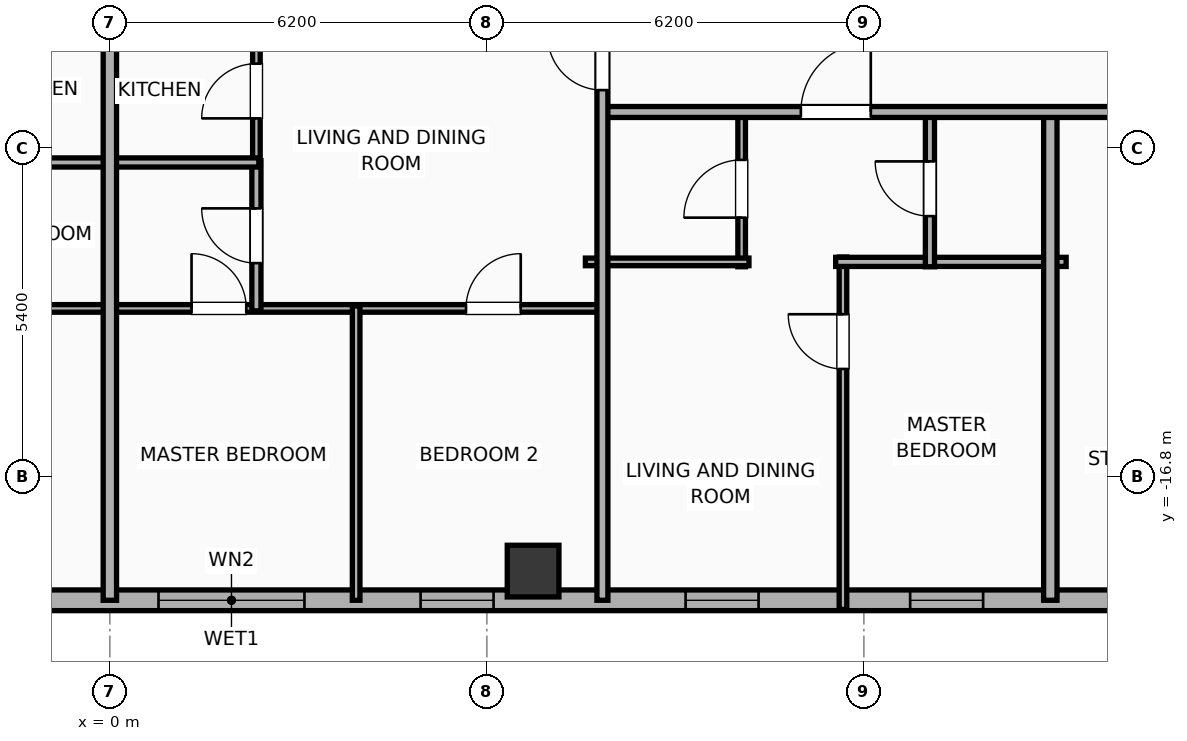
"""IFC4 building model, lengths in metres.
Left out: names, types, materials, properties, quantities, classifications, styles, units other than length and angle.
Written with IfcOpenShell. Run it as: python <this file> out.ifc"""

import sys

from ifc_helpers import new_model, si_unit, direction, frame, frame_2d, origin, origin_2d, place, context, subcontext, project, spatial, rectangle, hollow_rectangle, extrude, element, fill, save


model = new_model("IFC4")
c1 = context("Model", 3, precision=1e-05, world=origin(), true_north=direction((0.0, 1.0)))
c2 = subcontext(c1, "Body", "Model", "MODEL_VIEW")
j1 = project(units=[si_unit("LENGTHUNIT", "METRE"), si_unit("PLANEANGLEUNIT", "RADIAN")], contexts=[c1])
p1 = place(None, origin())
s1 = spatial("IfcSite", under=j1, at=p1, CompositionType="ELEMENT")
p2 = place(p1, origin())
s2 = spatial("IfcBuilding", under=s1, at=p2, CompositionType="ELEMENT")
p3 = place(p2, frame((0.0, 0.0, 215.8)))
s3 = spatial("IfcBuildingStorey", under=s2, at=p3, CompositionType="ELEMENT", Elevation=215.8)
p4 = place(p3, frame((6.96, -18.35, 0.0), z_axis=(0.0, 0.0, 1.0), x_axis=(1.0, 0.0, 0.0)))
e1 = element("IfcColumn", 1, at=p4, inside=s3, PredefinedType="COLUMN", context=c2, shape_type="SweptSolid", body=[
    extrude(hollow_rectangle(XDim=0.85, YDim=0.85, WallThickness=0.028, at=origin_2d()), origin(), (0.0, 0.0, 1.0), 3.9),
])
p5 = place(p3, frame((26.783, -18.83, 0.0), z_axis=(0.0, 0.0, 1.0), x_axis=(-1.0, 0.0, 0.0)))
e2 = element("IfcWall", 2, at=p5, inside=s3, PredefinedType="ELEMENTEDWALL", context=c2, shape_type="SweptSolid", body=[
    extrude(rectangle(XDim=49.566, YDim=0.34, at=frame_2d((24.783, 0.0))), origin(), (0.0, 0.0, 1.0), 3.65),
])
p6 = place(p5, frame((23.583, 0.0, 0.75)))
e3 = element("IfcOpeningElement", 3, at=p6, cuts=e2, PredefinedType="OPENING", context=c2, shape_type="SweptSolid", body=[
    extrude(rectangle(XDim=2.4, YDim=2.1, at=frame_2d((1.2, 1.05))), frame((0.0, 0.18, 0.0), z_axis=(0.0, -1.0, 0.0), x_axis=(1.0, 0.0, 0.0)), (0.0, 0.0, 1.0), 0.36),
])
p7 = place(p5, frame((41.756, 0.0, 0.75)))
e4 = element("IfcOpeningElement", 4, at=p7, cuts=e2, PredefinedType="OPENING", context=c2, shape_type="SweptSolid", body=[
    extrude(rectangle(XDim=2.4, YDim=2.1, at=frame_2d((1.2, 1.05))), frame((0.0, 0.18, 0.0), z_axis=(0.0, -1.0, 0.0), x_axis=(1.0, 0.0, 0.0)), (0.0, 0.0, 1.0), 0.36),
])
p8 = place(p5, frame((47.222, 0.0, 0.75)))
e5 = element("IfcOpeningElement", 5, at=p8, cuts=e2, PredefinedType="OPENING", context=c2, shape_type="SweptSolid", body=[
    extrude(rectangle(XDim=1.2, YDim=2.05, at=frame_2d((0.6, 1.025))), frame((0.0, 0.18, 0.0), z_axis=(0.0, -1.0, 0.0), x_axis=(1.0, 0.0, 0.0)), (0.0, 0.0, 1.0), 0.36),
])
p9 = place(p5, frame((45.08, 0.0, 0.75)))
e6 = element("IfcOpeningElement", 6, at=p9, cuts=e2, PredefinedType="OPENING", context=c2, shape_type="SweptSolid", body=[
    extrude(rectangle(XDim=1.2, YDim=2.05, at=frame_2d((0.6, 1.025))), frame((0.0, 0.18, 0.0), z_axis=(0.0, -1.0, 0.0), x_axis=(1.0, 0.0, 0.0)), (0.0, 0.0, 1.0), 0.36),
])
p10 = place(p5, frame((37.289, 0.0, 0.75)))
e7 = element("IfcOpeningElement", 7, at=p10, cuts=e2, PredefinedType="OPENING", context=c2, shape_type="SweptSolid", body=[
    extrude(rectangle(XDim=1.2, YDim=2.05, at=frame_2d((0.6, 1.025))), frame((0.0, 0.18, 0.0), z_axis=(0.0, -1.0, 0.0), x_axis=(1.0, 0.0, 0.0)), (0.0, 0.0, 1.0), 0.36),
])
p11 = place(p5, frame((16.115, 0.0, 0.75)))
e8 = element("IfcOpeningElement", 8, at=p11, cuts=e2, PredefinedType="OPENING", context=c2, shape_type="SweptSolid", body=[
    extrude(rectangle(XDim=1.2, YDim=2.05, at=frame_2d((0.6, 1.025))), frame((0.0, 0.18, 0.0), z_axis=(0.0, -1.0, 0.0), x_axis=(1.0, 0.0, 0.0)), (0.0, 0.0, 1.0), 0.36),
])
p12 = place(p5, frame((12.422, 0.0, 0.75)))
e9 = element("IfcOpeningElement", 9, at=p12, cuts=e2, PredefinedType="OPENING", context=c2, shape_type="SweptSolid", body=[
    extrude(rectangle(XDim=1.2, YDim=2.05, at=frame_2d((0.6, 1.025))), frame((0.0, 0.18, 0.0), z_axis=(0.0, -1.0, 0.0), x_axis=(1.0, 0.0, 0.0)), (0.0, 0.0, 1.0), 0.36),
])
p13 = place(p5, frame((8.09, 0.0, 0.75)))
e10 = element("IfcOpeningElement", 10, at=p13, cuts=e2, PredefinedType="OPENING", context=c2, shape_type="SweptSolid", body=[
    extrude(rectangle(XDim=1.2, YDim=2.05, at=frame_2d((0.6, 1.025))), frame((0.0, 0.18, 0.0), z_axis=(0.0, -1.0, 0.0), x_axis=(1.0, 0.0, 0.0)), (0.0, 0.0, 1.0), 0.36),
])
p14 = place(p5, frame((4.637, 0.0, 0.75)))
e11 = element("IfcOpeningElement", 11, at=p14, cuts=e2, PredefinedType="OPENING", context=c2, shape_type="SweptSolid", body=[
    extrude(rectangle(XDim=1.2, YDim=2.05, at=frame_2d((0.6, 1.025))), frame((0.0, 0.18, 0.0), z_axis=(0.0, -1.0, 0.0), x_axis=(1.0, 0.0, 0.0)), (0.0, 0.0, 1.0), 0.36),
])
p15 = place(p5, frame((1.811, 0.0, 0.75)))
e12 = element("IfcOpeningElement", 12, at=p15, cuts=e2, PredefinedType="OPENING", context=c2, shape_type="SweptSolid", body=[
    extrude(rectangle(XDim=1.2, YDim=2.05, at=frame_2d((0.6, 1.025))), frame((0.0, 0.18, 0.0), z_axis=(0.0, -1.0, 0.0), x_axis=(1.0, 0.0, 0.0)), (0.0, 0.0, 1.0), 0.36),
])
p16 = place(p5, frame((32.253, 0.0, 0.75)))
e13 = element("IfcOpeningElement", 13, at=p16, cuts=e2, PredefinedType="OPENING", context=c2, shape_type="SweptSolid", body=[
    extrude(rectangle(XDim=1.2, YDim=2.05, at=frame_2d((0.6, 1.025))), frame((0.0, 0.18, 0.0), z_axis=(0.0, -1.0, 0.0), x_axis=(1.0, 0.0, 0.0)), (0.0, 0.0, 1.0), 0.36),
])
p17 = place(p5, frame((27.853, 0.0, 0.75)))
e14 = element("IfcOpeningElement", 14, at=p17, cuts=e2, PredefinedType="OPENING", context=c2, shape_type="SweptSolid", body=[
    extrude(rectangle(XDim=1.2, YDim=2.05, at=frame_2d((0.6, 1.025))), frame((0.0, 0.18, 0.0), z_axis=(0.0, -1.0, 0.0), x_axis=(1.0, 0.0, 0.0)), (0.0, 0.0, 1.0), 0.36),
])
p18 = place(p5, frame((20.473, 0.0, 0.75)))
e15 = element("IfcOpeningElement", 15, at=p18, cuts=e2, PredefinedType="OPENING", context=c2, shape_type="SweptSolid", body=[
    extrude(rectangle(XDim=1.2, YDim=2.05, at=frame_2d((0.6, 1.025))), frame((0.0, 0.18, 0.0), z_axis=(0.0, -1.0, 0.0), x_axis=(1.0, 0.0, 0.0)), (0.0, 0.0, 1.0), 0.36),
])
p19 = place(p3, frame((12.056, -18.98, 0.0), z_axis=(0.0, 0.0, 1.0), x_axis=(0.0, 1.0, 0.0)))
e16 = element("IfcWall", 16, at=p19, inside=s3, PredefinedType="PARTITIONING", context=c2, shape_type="SweptSolid", body=[
    extrude(rectangle(XDim=5.795, YDim=0.125, at=frame_2d((2.897, 0.0))), origin(), (0.0, 0.0, 1.0), 3.65),
])
p20 = place(p19, frame((3.954, 0.0, 0.0)))
e17 = element("IfcOpeningElement", 17, at=p20, cuts=e16, PredefinedType="OPENING", context=c2, shape_type="SweptSolid", body=[
    extrude(rectangle(XDim=0.9, YDim=2.05, at=frame_2d((0.45, 1.025))), frame((0.0, 0.073, 0.0), z_axis=(0.0, -1.0, 0.0), x_axis=(1.0, 0.0, 0.0)), (0.0, 0.0, 1.0), 0.145),
])
p21 = place(p3, frame((11.936, -13.265, 0.0), z_axis=(0.0, 0.0, 1.0), x_axis=(1.0, 0.0, 0.0)))
e18 = element("IfcWall", 18, at=p21, inside=s3, PredefinedType="PLUMBINGWALL", context=c2, shape_type="SweptSolid", body=[
    extrude(rectangle(XDim=3.79, YDim=0.15, at=frame_2d((1.895, 0.0))), origin(), (0.0, 0.0, 1.0), 3.65),
])
p22 = place(p3, frame((10.39, -13.345, 0.0), z_axis=(0.0, 0.0, 1.0), x_axis=(0.0, 1.0, 0.0)))
e19 = element("IfcWall", 19, at=p22, inside=s3, PredefinedType="PARTITIONING", context=c2, shape_type="SweptSolid", body=[
    extrude(rectangle(XDim=2.565, YDim=0.125, at=frame_2d((1.282, 0.0))), origin(), (0.0, 0.0, 1.0), 3.65),
])
p23 = place(p22, frame((0.808, 0.0, 0.0)))
e20 = element("IfcOpeningElement", 20, at=p23, cuts=e19, PredefinedType="OPENING", context=c2, shape_type="SweptSolid", body=[
    extrude(rectangle(XDim=0.95, YDim=2.05, at=frame_2d((0.475, 1.025))), frame((0.0, 0.073, 0.0), z_axis=(0.0, -1.0, 0.0), x_axis=(1.0, 0.0, 0.0)), (0.0, 0.0, 1.0), 0.145),
])
p24 = place(p3, frame((7.82, -13.265, 0.0), z_axis=(0.0, 0.0, 1.0), x_axis=(1.0, 0.0, 0.0)))
e21 = element("IfcWall", 21, at=p24, inside=s3, PredefinedType="PARTITIONING", context=c2, shape_type="SweptSolid", body=[
    extrude(rectangle(XDim=2.69, YDim=0.125, at=frame_2d((1.345, 0.0))), origin(), (0.0, 0.0, 1.0), 3.65),
])
p25 = place(p3, frame((13.486, -13.345, 0.0), z_axis=(0.0, 0.0, 1.0), x_axis=(0.0, 1.0, 0.0)))
e22 = element("IfcWall", 22, at=p25, inside=s3, PredefinedType="PLUMBINGWALL", context=c2, shape_type="SweptSolid", body=[
    extrude(rectangle(XDim=2.565, YDim=0.15, at=frame_2d((1.282, 0.0))), origin(), (0.0, 0.0, 1.0), 3.65),
])
p26 = place(p25, frame((0.833, 0.0, 0.0)))
e23 = element("IfcOpeningElement", 23, at=p26, cuts=e22, PredefinedType="OPENING", context=c2, shape_type="SweptSolid", body=[
    extrude(rectangle(XDim=0.9, YDim=2.05, at=frame_2d((0.45, 1.025))), frame((0.0, 0.085, 0.0), z_axis=(0.0, -1.0, 0.0), x_axis=(1.0, 0.0, 0.0)), (0.0, 0.0, 1.0), 0.17),
])
p27 = place(p3, frame((15.466, -18.83, 0.0), z_axis=(0.0, 0.0, 1.0), x_axis=(0.0, 1.0, 0.0)))
e24 = element("IfcWall", 24, at=p27, inside=s3, PredefinedType="PARTITIONING", context=c2, shape_type="SweptSolid", body=[
    extrude(rectangle(XDim=8.11, YDim=0.22, at=frame_2d((4.055, 0.0))), origin(), (0.0, 0.0, 1.0), 3.65),
])
p28 = place(p3, frame((8.08, -10.8, 0.0), z_axis=(0.0, 0.0, 1.0), x_axis=(1.0, 0.0, 0.0)))
e25 = element("IfcWall", 25, at=p28, inside=s3, PredefinedType="PARTITIONING", context=c2, shape_type="SweptSolid", body=[
    extrude(rectangle(XDim=22.15, YDim=0.18, at=frame_2d((11.075, 0.0))), origin(), (0.0, 0.0, 1.0), 3.65),
])
p29 = place(p28, frame((3.283, 0.0, 0.0)))
e26 = element("IfcOpeningElement", 26, at=p29, cuts=e25, PredefinedType="OPENING", context=c2, shape_type="SweptSolid", body=[
    extrude(rectangle(XDim=1.15, YDim=2.05, at=frame_2d((0.575, 1.025))), frame((0.0, 0.1, 0.0), z_axis=(0.0, -1.0, 0.0), x_axis=(1.0, 0.0, 0.0)), (0.0, 0.0, 1.0), 0.2),
])
p30 = place(p28, frame((9.229, 0.0, 0.0)))
e27 = element("IfcOpeningElement", 27, at=p30, cuts=e25, PredefinedType="OPENING", context=c2, shape_type="SweptSolid", body=[
    extrude(rectangle(XDim=1.15, YDim=2.05, at=frame_2d((0.575, 1.025))), frame((0.0, 0.1, 0.0), z_axis=(0.0, -1.0, 0.0), x_axis=(1.0, 0.0, 0.0)), (0.0, 0.0, 1.0), 0.2),
])
p31 = place(p28, frame((18.084, 0.0, 0.0)))
e28 = element("IfcOpeningElement", 28, at=p31, cuts=e25, PredefinedType="OPENING", context=c2, shape_type="SweptSolid", body=[
    extrude(rectangle(XDim=1.15, YDim=2.05, at=frame_2d((0.575, 1.025))), frame((0.0, 0.1, 0.0), z_axis=(0.0, -1.0, 0.0), x_axis=(1.0, 0.0, 0.0)), (0.0, 0.0, 1.0), 0.2),
])
p32 = place(p3, frame((-8.08, -14.03, 0.0), z_axis=(0.0, 0.0, 1.0), x_axis=(1.0, 0.0, 0.0)))
e29 = element("IfcWall", 29, at=p32, inside=s3, PredefinedType="PARTITIONING", context=c2, shape_type="SweptSolid", body=[
    extrude(rectangle(XDim=8.06, YDim=0.125, at=frame_2d((4.03, 0.0))), origin(), (0.0, 0.0, 1.0), 3.65),
])
p33 = place(p32, frame((1.323, 0.0, 0.0)))
e30 = element("IfcOpeningElement", 30, at=p33, cuts=e29, PredefinedType="OPENING", context=c2, shape_type="SweptSolid", body=[
    extrude(rectangle(XDim=0.9, YDim=2.05, at=frame_2d((0.45, 1.025))), frame((0.0, 0.073, 0.0), z_axis=(0.0, -1.0, 0.0), x_axis=(1.0, 0.0, 0.0)), (0.0, 0.0, 1.0), 0.145),
])
p34 = place(p32, frame((4.547, 0.0, 0.0)))
e31 = element("IfcOpeningElement", 31, at=p34, cuts=e29, PredefinedType="OPENING", context=c2, shape_type="SweptSolid", body=[
    extrude(rectangle(XDim=0.9, YDim=2.05, at=frame_2d((0.45, 1.025))), frame((0.0, 0.073, 0.0), z_axis=(0.0, -1.0, 0.0), x_axis=(1.0, 0.0, 0.0)), (0.0, 0.0, 1.0), 0.145),
])
p35 = place(p3, frame((-2.45, -11.63, 0.0), z_axis=(0.0, 0.0, 1.0), x_axis=(1.0, 0.0, 0.0)))
e32 = element("IfcWall", 32, at=p35, inside=s3, PredefinedType="PLUMBINGWALL", context=c2, shape_type="SweptSolid", body=[
    extrude(rectangle(XDim=2.43, YDim=0.15, at=frame_2d((1.215, 0.0))), origin(), (0.0, 0.0, 1.0), 3.65),
])
p36 = place(p3, frame((0.02, -14.03, 0.0), z_axis=(0.0, 0.0, 1.0), x_axis=(1.0, 0.0, 0.0)))
e33 = element("IfcWall", 33, at=p36, inside=s3, PredefinedType="PARTITIONING", context=c2, shape_type="SweptSolid", body=[
    extrude(rectangle(XDim=8.06, YDim=0.125, at=frame_2d((4.03, 0.0))), origin(), (0.0, 0.0, 1.0), 3.65),
])
p37 = place(p36, frame((1.323, 0.0, 0.0)))
e34 = element("IfcOpeningElement", 34, at=p37, cuts=e33, PredefinedType="OPENING", context=c2, shape_type="SweptSolid", body=[
    extrude(rectangle(XDim=0.9, YDim=2.05, at=frame_2d((0.45, 1.025))), frame((0.0, 0.073, 0.0), z_axis=(0.0, -1.0, 0.0), x_axis=(1.0, 0.0, 0.0)), (0.0, 0.0, 1.0), 0.145),
])
p38 = place(p36, frame((5.837, 0.0, 0.0)))
e35 = element("IfcOpeningElement", 35, at=p38, cuts=e33, PredefinedType="OPENING", context=c2, shape_type="SweptSolid", body=[
    extrude(rectangle(XDim=0.9, YDim=2.05, at=frame_2d((0.45, 1.025))), frame((0.0, 0.073, 0.0), z_axis=(0.0, -1.0, 0.0), x_axis=(1.0, 0.0, 0.0)), (0.0, 0.0, 1.0), 0.145),
])
p39 = place(p3, frame((2.41, -11.66, 0.0), z_axis=(0.0, 0.0, 1.0), x_axis=(0.0, 1.0, 0.0)))
e36 = element("IfcWall", 36, at=p39, inside=s3, PredefinedType="PARTITIONING", context=c2, shape_type="SweptSolid", body=[
    extrude(rectangle(XDim=2.41, YDim=0.125, at=frame_2d((1.205, 0.0))), origin(), (0.0, 0.0, 1.0), 3.65),
])
p40 = place(p39, frame((0.755, 0.0, 0.0)))
e37 = element("IfcOpeningElement", 37, at=p40, cuts=e36, PredefinedType="OPENING", context=c2, shape_type="SweptSolid", body=[
    extrude(rectangle(XDim=0.9, YDim=2.05, at=frame_2d((0.45, 1.025))), frame((0.0, 0.073, 0.0), z_axis=(0.0, -1.0, 0.0), x_axis=(1.0, 0.0, 0.0)), (0.0, 0.0, 1.0), 0.145),
])
p41 = place(p3, frame((2.41, -14.07, 0.0), z_axis=(0.0, 0.0, 1.0), x_axis=(0.0, 1.0, 0.0)))
e38 = element("IfcWall", 38, at=p41, inside=s3, PredefinedType="PLUMBINGWALL", context=c2, shape_type="SweptSolid", body=[
    extrude(rectangle(XDim=2.47, YDim=0.15, at=frame_2d((1.235, 0.0))), origin(), (0.0, 0.0, 1.0), 3.65),
])
p42 = place(p41, frame((0.785, 0.0, 0.0)))
e39 = element("IfcOpeningElement", 39, at=p42, cuts=e38, PredefinedType="OPENING", context=c2, shape_type="SweptSolid", body=[
    extrude(rectangle(XDim=0.9, YDim=2.05, at=frame_2d((0.45, 1.025))), frame((0.0, 0.085, 0.0), z_axis=(0.0, -1.0, 0.0), x_axis=(1.0, 0.0, 0.0)), (0.0, 0.0, 1.0), 0.17),
])
p43 = place(p3, frame((0.02, -11.63, 0.0), z_axis=(0.0, 0.0, 1.0), x_axis=(1.0, 0.0, 0.0)))
e40 = element("IfcWall", 40, at=p43, inside=s3, PredefinedType="PLUMBINGWALL", context=c2, shape_type="SweptSolid", body=[
    extrude(rectangle(XDim=2.43, YDim=0.15, at=frame_2d((1.215, 0.0))), origin(), (0.0, 0.0, 1.0), 3.65),
])
p44 = place(p3, frame((4.05, -18.83, 0.0), z_axis=(0.0, 0.0, 1.0), x_axis=(0.0, 1.0, 0.0)))
e41 = element("IfcWall", 41, at=p44, inside=s3, PredefinedType="PARTITIONING", context=c2, shape_type="SweptSolid", body=[
    extrude(rectangle(XDim=4.84, YDim=0.125, at=frame_2d((2.42, 0.0))), origin(), (0.0, 0.0, 1.0), 3.65),
])
p45 = place(p3, frame((8.1, -18.83, 0.0), z_axis=(0.0, 0.0, 1.0), x_axis=(0.0, 1.0, 0.0)))
e42 = element("IfcWall", 42, at=p45, inside=s3, PredefinedType="PARTITIONING", context=c2, shape_type="SweptSolid", body=[
    extrude(rectangle(XDim=9.64, YDim=0.18, at=frame_2d((4.82, 0.0))), origin(), (0.0, 0.0, 1.0), 3.65),
])
p46 = place(p45, frame((8.39, 0.0, 0.0)))
e43 = element("IfcOpeningElement", 43, at=p46, cuts=e42, PredefinedType="OPENING", context=c2, shape_type="SweptSolid", body=[
    extrude(rectangle(XDim=0.9, YDim=2.05, at=frame_2d((0.45, 1.025))), frame((0.0, 0.1, 0.0), z_axis=(0.0, -1.0, 0.0), x_axis=(1.0, 0.0, 0.0)), (0.0, 0.0, 1.0), 0.2),
])
p47 = place(p3, frame((0.0, -18.83, 0.0), z_axis=(0.0, 0.0, 1.0), x_axis=(0.0, 1.0, 0.0)))
e44 = element("IfcWall", 44, at=p47, inside=s3, PredefinedType="PARTITIONING", context=c2, shape_type="SweptSolid", body=[
    extrude(rectangle(XDim=9.64, YDim=0.22, at=frame_2d((4.82, 0.0))), origin(), (0.0, 0.0, 1.0), 3.65),
])
p48 = place(p6, origin())
e45 = element("IfcWindow", 45, at=p48, inside=s3, PartitioningType="SINGLE_PANEL", PredefinedType="WINDOW", context=c2, shape_type="SweptSolid", body=[
    extrude(rectangle(XDim=2.4, YDim=2.1, at=frame_2d((1.2, 1.05))), frame((0.0, 0.03, 0.0), z_axis=(0.0, -1.0, 0.0), x_axis=(1.0, 0.0, 0.0)), (0.0, 0.0, 1.0), 0.06),
])
fill(e3, e45)
p49 = place(p11, origin())
e46 = element("IfcWindow", 46, at=p49, inside=s3, PartitioningType="SINGLE_PANEL", PredefinedType="WINDOW", context=c2, shape_type="SweptSolid", body=[
    extrude(rectangle(XDim=1.2, YDim=2.05, at=frame_2d((0.6, 1.025))), frame((0.0, 0.03, 0.0), z_axis=(0.0, -1.0, 0.0), x_axis=(1.0, 0.0, 0.0)), (0.0, 0.0, 1.0), 0.06),
])
fill(e8, e46)
p50 = place(p12, origin())
e47 = element("IfcWindow", 47, at=p50, inside=s3, PartitioningType="SINGLE_PANEL", PredefinedType="WINDOW", context=c2, shape_type="SweptSolid", body=[
    extrude(rectangle(XDim=1.2, YDim=2.05, at=frame_2d((0.6, 1.025))), frame((0.0, 0.03, 0.0), z_axis=(0.0, -1.0, 0.0), x_axis=(1.0, 0.0, 0.0)), (0.0, 0.0, 1.0), 0.06),
])
fill(e9, e47)
p51 = place(p18, origin())
e48 = element("IfcWindow", 48, at=p51, inside=s3, PartitioningType="SINGLE_PANEL", PredefinedType="WINDOW", context=c2, shape_type="SweptSolid", body=[
    extrude(rectangle(XDim=1.2, YDim=2.05, at=frame_2d((0.6, 1.025))), frame((0.0, 0.03, 0.0), z_axis=(0.0, -1.0, 0.0), x_axis=(1.0, 0.0, 0.0)), (0.0, 0.0, 1.0), 0.06),
])
fill(e15, e48)
p52 = place(p20, origin())
e49 = element("IfcDoor", 49, at=p52, inside=s3, OperationType="SINGLE_SWING_RIGHT", PredefinedType="DOOR", context=c2, shape_type="SweptSolid", body=[
    extrude(rectangle(XDim=0.9, YDim=2.05, at=frame_2d((0.45, 1.025))), frame((0.0, 0.025, 0.0), z_axis=(0.0, -1.0, 0.0), x_axis=(1.0, 0.0, 0.0)), (0.0, 0.0, 1.0), 0.05),
])
fill(e17, e49)
p53 = place(p23, origin())
e50 = element("IfcDoor", 50, at=p53, inside=s3, OperationType="SINGLE_SWING_LEFT", PredefinedType="DOOR", context=c2, shape_type="SweptSolid", body=[
    extrude(rectangle(XDim=0.95, YDim=2.05, at=frame_2d((0.475, 1.025))), frame((0.0, 0.025, 0.0), z_axis=(0.0, -1.0, 0.0), x_axis=(1.0, 0.0, 0.0)), (0.0, 0.0, 1.0), 0.05),
])
fill(e20, e50)
p54 = place(p26, origin())
e51 = element("IfcDoor", 51, at=p54, inside=s3, OperationType="SINGLE_SWING_RIGHT", PredefinedType="DOOR", context=c2, shape_type="SweptSolid", body=[
    extrude(rectangle(XDim=0.9, YDim=2.05, at=frame_2d((0.45, 1.025))), frame((0.0, 0.025, 0.0), z_axis=(0.0, -1.0, 0.0), x_axis=(1.0, 0.0, 0.0)), (0.0, 0.0, 1.0), 0.05),
])
fill(e23, e51)
p55 = place(p29, origin())
e52 = element("IfcDoor", 52, at=p55, inside=s3, OperationType="SINGLE_SWING_RIGHT", PredefinedType="DOOR", context=c2, shape_type="SweptSolid", body=[
    extrude(rectangle(XDim=1.15, YDim=2.05, at=frame_2d((0.575, 1.025))), frame((0.0, 0.025, 0.0), z_axis=(0.0, -1.0, 0.0), x_axis=(1.0, 0.0, 0.0)), (0.0, 0.0, 1.0), 0.05),
])
fill(e26, e52)
p56 = place(p37, origin())
e53 = element("IfcDoor", 53, at=p56, inside=s3, OperationType="SINGLE_SWING_LEFT", PredefinedType="DOOR", context=c2, shape_type="SweptSolid", body=[
    extrude(rectangle(XDim=0.9, YDim=2.05, at=frame_2d((0.45, 1.025))), frame((0.0, 0.025, 0.0), z_axis=(0.0, -1.0, 0.0), x_axis=(1.0, 0.0, 0.0)), (0.0, 0.0, 1.0), 0.05),
])
fill(e34, e53)
p57 = place(p38, origin())
e54 = element("IfcDoor", 54, at=p57, inside=s3, OperationType="SINGLE_SWING_RIGHT", PredefinedType="DOOR", context=c2, shape_type="SweptSolid", body=[
    extrude(rectangle(XDim=0.9, YDim=2.05, at=frame_2d((0.45, 1.025))), frame((0.0, 0.025, 0.0), z_axis=(0.0, -1.0, 0.0), x_axis=(1.0, 0.0, 0.0)), (0.0, 0.0, 1.0), 0.05),
])
fill(e35, e54)
p58 = place(p40, origin())
e55 = element("IfcDoor", 55, at=p58, inside=s3, OperationType="SINGLE_SWING_LEFT", PredefinedType="DOOR", context=c2, shape_type="SweptSolid", body=[
    extrude(rectangle(XDim=0.9, YDim=2.05, at=frame_2d((0.45, 1.025))), frame((0.0, 0.025, 0.0), z_axis=(0.0, -1.0, 0.0), x_axis=(1.0, 0.0, 0.0)), (0.0, 0.0, 1.0), 0.05),
])
fill(e37, e55)
p59 = place(p42, origin())
e56 = element("IfcDoor", 56, at=p59, inside=s3, OperationType="SINGLE_SWING_RIGHT", PredefinedType="DOOR", context=c2, shape_type="SweptSolid", body=[
    extrude(rectangle(XDim=0.9, YDim=2.05, at=frame_2d((0.45, 1.025))), frame((0.0, 0.025, 0.0), z_axis=(0.0, -1.0, 0.0), x_axis=(1.0, 0.0, 0.0)), (0.0, 0.0, 1.0), 0.05),
])
fill(e39, e56)
p60 = place(p46, origin())
e57 = element("IfcDoor", 57, at=p60, inside=s3, OperationType="SINGLE_SWING_RIGHT", PredefinedType="DOOR", context=c2, shape_type="SweptSolid", body=[
    extrude(rectangle(XDim=0.9, YDim=2.05, at=frame_2d((0.45, 1.025))), frame((0.0, 0.025, 0.0), z_axis=(0.0, -1.0, 0.0), x_axis=(1.0, 0.0, 0.0)), (0.0, 0.0, 1.0), 0.05),
])
fill(e43, e57)
save(model, sys.argv[1])
